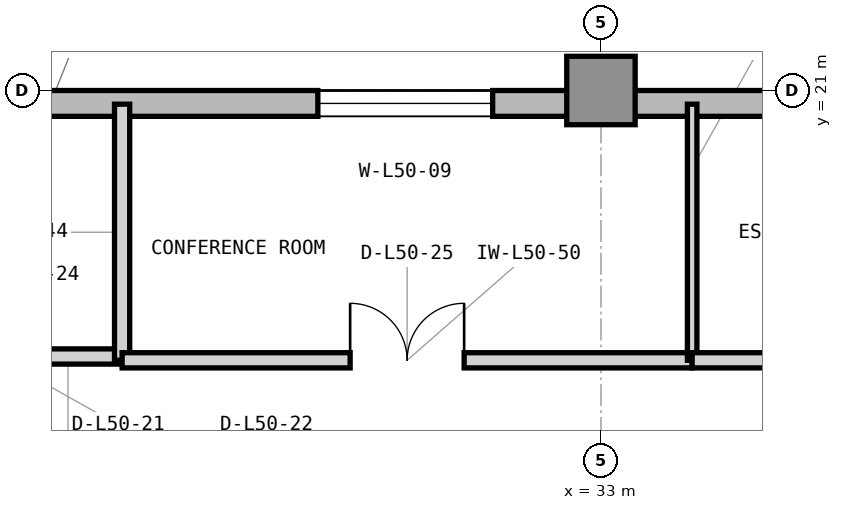
"""IFC4 building model, lengths in metres.
Left out: names, types, materials, properties, quantities, classifications, styles, units other than length and angle.
Written with IfcOpenShell. Run it as: python <this file> out.ifc"""

import sys

from ifc_helpers import new_model, si_unit, direction, frame, frame_2d, origin, origin_2d, place, context, subcontext, project, spatial, rectangle, extrude, element, fill, save


model = new_model("IFC4")
c1 = context("Model", 3, precision=1e-05, world=origin(), true_north=direction((0.0, 1.0)))
c2 = subcontext(c1, "Body", "Model", "MODEL_VIEW")
j1 = project(units=[si_unit("LENGTHUNIT", "METRE"), si_unit("PLANEANGLEUNIT", "RADIAN")], contexts=[c1])
p1 = place(None, origin())
s1 = spatial("IfcSite", under=j1, at=p1, CompositionType="ELEMENT")
p2 = place(p1, origin())
s2 = spatial("IfcBuilding", under=s1, at=p2, CompositionType="ELEMENT")
p3 = place(p2, frame((0.0, 0.0, 207.3)))
s3 = spatial("IfcBuildingStorey", under=s2, at=p3, CompositionType="ELEMENT", Elevation=207.3)
p4 = place(p3, frame((33.0, 21.0, 0.0), z_axis=(0.0, 0.0, 1.0), x_axis=(1.0, 0.0, 0.0)))
e1 = element("IfcColumn", 1, at=p4, inside=s3, PredefinedType="COLUMN", context=c2, shape_type="SweptSolid", body=[
    extrude(rectangle(XDim=0.9, YDim=0.9, at=origin_2d()), origin(), (0.0, 0.0, 1.0), 3.9),
])
p5 = place(p3, frame((55.4, 20.83, 0.0), z_axis=(0.0, 0.0, 1.0), x_axis=(-1.0, 0.0, 0.0)))
e2 = element("IfcWall", 2, at=p5, inside=s3, PredefinedType="STANDARD", context=c2, shape_type="SweptSolid", body=[
    extrude(rectangle(XDim=31.4, YDim=0.34, at=frame_2d((15.7, 0.0))), origin(), (0.0, 0.0, 1.0), 3.7),
])
p6 = place(p5, frame((17.167, 0.0, 0.9)))
e3 = element("IfcOpeningElement", 3, at=p6, cuts=e2, PredefinedType="OPENING", context=c2, shape_type="SweptSolid", body=[
    extrude(rectangle(XDim=2.3, YDim=2.2, at=frame_2d((1.15, 1.1))), frame((0.0, 0.18, 0.0), z_axis=(0.0, -1.0, 0.0), x_axis=(1.0, 0.0, 0.0)), (0.0, 0.0, 1.0), 0.36),
])
p7 = place(p5, frame((23.825, 0.0, 0.9)))
e4 = element("IfcOpeningElement", 4, at=p7, cuts=e2, PredefinedType="OPENING", context=c2, shape_type="SweptSolid", body=[
    extrude(rectangle(XDim=2.3, YDim=2.2, at=frame_2d((1.15, 1.1))), frame((0.0, 0.18, 0.0), z_axis=(0.0, -1.0, 0.0), x_axis=(1.0, 0.0, 0.0)), (0.0, 0.0, 1.0), 0.36),
])
p8 = place(p5, frame((8.375, 0.0, 0.9)))
e5 = element("IfcOpeningElement", 5, at=p8, cuts=e2, PredefinedType="OPENING", context=c2, shape_type="SweptSolid", body=[
    extrude(rectangle(XDim=2.3, YDim=2.2, at=frame_2d((1.15, 1.1))), frame((0.0, 0.18, 0.0), z_axis=(0.0, -1.0, 0.0), x_axis=(1.0, 0.0, 0.0)), (0.0, 0.0, 1.0), 0.36),
])
p9 = place(p3, frame((23.85, 17.5, 0.0), z_axis=(0.0, 0.0, 1.0), x_axis=(1.0, 0.0, 0.0)))
e6 = element("IfcWall", 6, at=p9, inside=s3, PredefinedType="PARTITIONING", context=c2, shape_type="SweptSolid", body=[
    extrude(rectangle(XDim=2.85, YDim=0.2, at=frame_2d((1.425, 0.0))), origin(), (0.0, 0.0, 1.0), 3.69),
])
p10 = place(p9, frame((0.7, 0.0, 0.0)))
e7 = element("IfcOpeningElement", 7, at=p10, cuts=e6, PredefinedType="OPENING", context=c2, shape_type="SweptSolid", body=[
    extrude(rectangle(XDim=1.0, YDim=2.15, at=frame_2d((0.5, 1.075))), frame((0.0, 0.11, 0.0), z_axis=(0.0, -1.0, 0.0), x_axis=(1.0, 0.0, 0.0)), (0.0, 0.0, 1.0), 0.22),
])
p11 = place(p3, frame((26.7, 17.45, 0.0), z_axis=(0.0, 0.0, 1.0), x_axis=(0.0, 1.0, 0.0)))
e8 = element("IfcWall", 8, at=p11, inside=s3, PredefinedType="PARTITIONING", context=c2, shape_type="SweptSolid", body=[
    extrude(rectangle(XDim=3.37, YDim=0.2, at=frame_2d((1.685, 0.0))), origin(), (0.0, 0.0, 1.0), 3.69),
])
p12 = place(p3, frame((26.7, 17.45, 0.0), z_axis=(0.0, 0.0, 1.0), x_axis=(1.0, 0.0, 0.0)))
e9 = element("IfcWall", 9, at=p12, inside=s3, PredefinedType="PARTITIONING", context=c2, shape_type="SweptSolid", body=[
    extrude(rectangle(XDim=7.5, YDim=0.2, at=frame_2d((3.75, 0.0))), origin(), (0.0, 0.0, 1.0), 3.69),
])
p13 = place(p12, frame((3.0, 0.0, 0.0)))
e10 = element("IfcOpeningElement", 10, at=p13, cuts=e9, PredefinedType="OPENING", context=c2, shape_type="SweptSolid", body=[
    extrude(rectangle(XDim=1.5, YDim=2.3, at=frame_2d((0.75, 1.15))), frame((0.0, 0.11, 0.0), z_axis=(0.0, -1.0, 0.0), x_axis=(1.0, 0.0, 0.0)), (0.0, 0.0, 1.0), 0.22),
])
p14 = place(p3, frame((34.2, 17.45, 0.0), z_axis=(0.0, 0.0, 1.0), x_axis=(0.0, 1.0, 0.0)))
e11 = element("IfcWall", 11, at=p14, inside=s3, PredefinedType="PARTITIONING", context=c2, shape_type="SweptSolid", body=[
    extrude(rectangle(XDim=3.37, YDim=0.125, at=frame_2d((1.685, 0.0))), origin(), (0.0, 0.0, 1.0), 3.69),
])
p15 = place(p3, frame((34.2, 17.45, 0.0), z_axis=(0.0, 0.0, 1.0), x_axis=(1.0, 0.0, 0.0)))
e12 = element("IfcWall", 12, at=p15, inside=s3, PredefinedType="PARTITIONING", context=c2, shape_type="SweptSolid", body=[
    extrude(rectangle(XDim=7.5, YDim=0.2, at=frame_2d((3.75, 0.0))), origin(), (0.0, 0.0, 1.0), 3.69),
])
p16 = place(p15, frame((3.25, 0.0, 0.0)))
e13 = element("IfcOpeningElement", 13, at=p16, cuts=e12, PredefinedType="OPENING", context=c2, shape_type="SweptSolid", body=[
    extrude(rectangle(XDim=1.0, YDim=2.15, at=frame_2d((0.5, 1.075))), frame((0.0, 0.11, 0.0), z_axis=(0.0, -1.0, 0.0), x_axis=(1.0, 0.0, 0.0)), (0.0, 0.0, 1.0), 0.22),
])
p17 = place(p13, origin())
e14 = element("IfcDoor", 14, at=p17, inside=s3, OperationType="DOUBLE_DOOR_SINGLE_SWING", PredefinedType="DOOR", context=c2, shape_type="SweptSolid", body=[
    extrude(rectangle(XDim=1.5, YDim=2.3, at=frame_2d((0.75, 1.15))), frame((0.0, 0.025, 0.0), z_axis=(0.0, -1.0, 0.0), x_axis=(1.0, 0.0, 0.0)), (0.0, 0.0, 1.0), 0.05),
])
fill(e10, e14)
p18 = place(p7, origin())
e15 = element("IfcWindow", 15, at=p18, inside=s3, PartitioningType="SINGLE_PANEL", PredefinedType="WINDOW", context=c2, shape_type="SweptSolid", body=[
    extrude(rectangle(XDim=2.3, YDim=2.2, at=frame_2d((1.15, 1.1))), frame((0.0, 0.11, 0.0), z_axis=(0.0, -1.0, 0.0), x_axis=(1.0, 0.0, 0.0)), (0.0, 0.0, 1.0), 0.06),
])
fill(e4, e15)
save(model, sys.argv[1])
